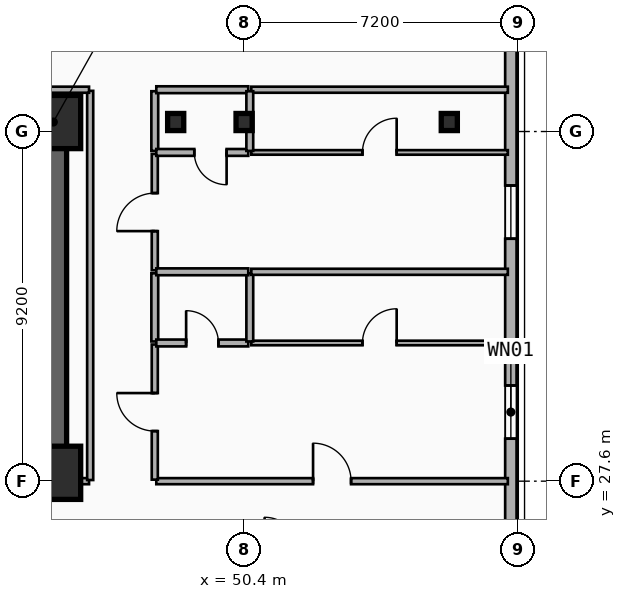
"""IFC4 building model, lengths in metres.
Left out: names, types, materials, properties, quantities, classifications, styles, units other than length and angle.
Written with IfcOpenShell. Run it as: python <this file> out.ifc"""

import sys

from ifc_helpers import new_model, si_unit, direction, frame, frame_2d, origin, origin_2d, place, context, subcontext, project, spatial, rectangle, i_section, extrude, element, fill, save


model = new_model("IFC4")
c1 = context("Model", 3, precision=1e-05, world=origin(), true_north=direction((0.0, 1.0)))
c2 = subcontext(c1, "Body", "Model", "MODEL_VIEW")
j1 = project(units=[si_unit("LENGTHUNIT", "METRE"), si_unit("PLANEANGLEUNIT", "RADIAN")], contexts=[c1])
p1 = place(None, origin())
s1 = spatial("IfcSite", under=j1, at=p1, CompositionType="ELEMENT")
p2 = place(p1, origin())
s2 = spatial("IfcBuilding", under=s1, at=p2, CompositionType="ELEMENT")
p3 = place(p2, frame((0.0, 0.0, 43.0)))
s3 = spatial("IfcBuildingStorey", under=s2, at=p3, CompositionType="ELEMENT", Elevation=43.0)
p4 = place(p3, frame((12.15, 37.05, 0.0), z_axis=(0.0, 0.0, 1.0), x_axis=(1.0, 0.0, 0.0)))
e1 = element("IfcWall", 1, at=p4, inside=s3, PredefinedType="SHEAR", context=c2, shape_type="SweptSolid", body=[
    extrude(rectangle(XDim=33.23, YDim=0.7, at=frame_2d((16.615, 0.0))), origin(), (0.0, 0.0, 1.0), 3.5),
])
p5 = place(p3, frame((45.38, 27.82, 0.0), z_axis=(0.0, 0.0, 1.0), x_axis=(-1.0, 0.0, 0.0)))
e2 = element("IfcWall", 2, at=p5, inside=s3, PredefinedType="SHEAR", context=c2, shape_type="SweptSolid", body=[
    extrude(rectangle(XDim=12.23, YDim=0.7, at=frame_2d((6.115, 0.0))), origin(), (0.0, 0.0, 1.0), 3.5),
])
p6 = place(p5, frame((9.93, 0.0, 0.0)))
e3 = element("IfcOpeningElement", 3, at=p6, cuts=e2, PredefinedType="OPENING", context=c2, shape_type="SweptSolid", body=[
    extrude(rectangle(XDim=1.1, YDim=2.15, at=frame_2d((0.55, 1.075))), frame((0.0, 0.36, 0.0), z_axis=(0.0, -1.0, 0.0), x_axis=(1.0, 0.0, 0.0)), (0.0, 0.0, 1.0), 0.72),
])
p7 = place(p5, frame((6.23, 0.0, 0.0)))
e4 = element("IfcOpeningElement", 4, at=p7, cuts=e2, PredefinedType="OPENING", context=c2, shape_type="SweptSolid", body=[
    extrude(rectangle(XDim=1.1, YDim=2.15, at=frame_2d((0.55, 1.075))), frame((0.0, 0.36, 0.0), z_axis=(0.0, -1.0, 0.0), x_axis=(1.0, 0.0, 0.0)), (0.0, 0.0, 1.0), 0.72),
])
p8 = place(p3, frame((45.38, 28.17, 0.0), z_axis=(0.0, 0.0, 1.0), x_axis=(0.0, 1.0, 0.0)))
e5 = element("IfcWall", 5, at=p8, inside=s3, PredefinedType="SHEAR", context=c2, shape_type="SweptSolid", body=[
    extrude(rectangle(XDim=8.53, YDim=0.7, at=frame_2d((4.265, 0.0))), origin(), (0.0, 0.0, 1.0), 3.5),
])
for number, where, z_axis, x_axis in (
    (6, (45.4, 27.82, 0.0), (0.0, 0.0, 1.0), (1.0, 0.0, 0.0)),
    (7, (45.4, 37.05, 0.0), (0.0, 0.0, 1.0), (1.0, 0.0, 0.0)),
):
    element("IfcColumn", number, at=place(p3, frame(where, z_axis=z_axis, x_axis=x_axis)), inside=s3, PredefinedType="COLUMN", context=c2, shape_type="SweptSolid", body=[
        extrude(rectangle(XDim=1.4, YDim=1.4, at=origin_2d()), origin(), (0.0, 0.0, 1.0), 3.5),
    ])
for number, where, z_axis, x_axis in (
    (8, (48.6, 37.05, 0.0), (0.0, 0.0, 1.0), (1.0, 0.0, 0.0)),
    (9, (50.4, 37.05, 0.0), (0.0, 0.0, 1.0), (1.0, 0.0, 0.0)),
    (10, (55.8, 37.05, 0.0), (0.0, 0.0, 1.0), (1.0, 0.0, 0.0)),
):
    element("IfcColumn", number, at=place(p3, frame(where, z_axis=z_axis, x_axis=x_axis)), inside=s3, PredefinedType="COLUMN", context=c2, shape_type="SweptSolid", body=[
        extrude(i_section(OverallWidth=0.424, OverallDepth=0.45, WebThickness=0.041, FlangeThickness=0.065, FilletRadius=0.015, at=origin_2d()), origin(), (0.0, 0.0, 1.0), 3.5),
    ])
p9 = place(p3, frame((57.42, 41.0, 0.0), z_axis=(0.0, 0.0, 1.0), x_axis=(0.0, -1.0, 0.0)))
e11 = element("IfcWall", 11, at=p9, inside=s3, PredefinedType="SOLIDWALL", context=c2, shape_type="SweptSolid", body=[
    extrude(rectangle(XDim=15.2, YDim=0.3, at=frame_2d((7.6, 0.0))), origin(), (0.0, 0.0, 1.0), 3.24),
])
p10 = place(p9, frame((10.882, 0.0, 0.48)))
e12 = element("IfcOpeningElement", 12, at=p10, cuts=e11, PredefinedType="OPENING", context=c2, shape_type="SweptSolid", body=[
    extrude(rectangle(XDim=1.4, YDim=1.8, at=frame_2d((0.7, 0.9))), frame((0.0, 0.16, 0.0), z_axis=(0.0, -1.0, 0.0), x_axis=(1.0, 0.0, 0.0)), (0.0, 0.0, 1.0), 0.32),
])
p11 = place(p9, frame((5.621, 0.0, 0.48)))
e13 = element("IfcOpeningElement", 13, at=p11, cuts=e11, PredefinedType="OPENING", context=c2, shape_type="SweptSolid", body=[
    extrude(rectangle(XDim=1.4, YDim=1.8, at=frame_2d((0.7, 0.9))), frame((0.0, 0.16, 0.0), z_axis=(0.0, -1.0, 0.0), x_axis=(1.0, 0.0, 0.0)), (0.0, 0.0, 1.0), 0.32),
])
p12 = place(p3, frame((48.09, 27.6, 0.0), z_axis=(0.0, 0.0, 1.0), x_axis=(1.0, 0.0, 0.0)))
e14 = element("IfcWall", 14, at=p12, inside=s3, PredefinedType="PARTITIONING", context=c2, shape_type="SweptSolid", body=[
    extrude(rectangle(XDim=9.25, YDim=0.16, at=frame_2d((4.625, 0.0))), origin(), (0.0, 0.0, 1.0), 2.57),
])
p13 = place(p12, frame((4.125, 0.0, 0.0)))
e15 = element("IfcOpeningElement", 15, at=p13, cuts=e14, PredefinedType="OPENING", context=c2, shape_type="SweptSolid", body=[
    extrude(rectangle(XDim=1.0, YDim=2.15, at=frame_2d((0.5, 1.075))), frame((0.0, 0.09, 0.0), z_axis=(0.0, -1.0, 0.0), x_axis=(1.0, 0.0, 0.0)), (0.0, 0.0, 1.0), 0.18),
])
p14 = place(p3, frame((48.05, 27.64, 0.0), z_axis=(0.0, 0.0, 1.0), x_axis=(0.0, 1.0, 0.0)))
e16 = element("IfcWall", 16, at=p14, inside=s3, PredefinedType="PARTITIONING", context=c2, shape_type="SweptSolid", body=[
    extrude(rectangle(XDim=3.556, YDim=0.16, at=frame_2d((1.778, 0.0))), origin(), (0.0, 0.0, 1.0), 3.24),
])
p15 = place(p14, frame((1.278, 0.0, 0.0)))
e17 = element("IfcOpeningElement", 17, at=p15, cuts=e16, PredefinedType="OPENING", context=c2, shape_type="SweptSolid", body=[
    extrude(rectangle(XDim=1.0, YDim=2.15, at=frame_2d((0.5, 1.075))), frame((0.0, 0.09, 0.0), z_axis=(0.0, -1.0, 0.0), x_axis=(1.0, 0.0, 0.0)), (0.0, 0.0, 1.0), 0.18),
])
p16 = place(p3, frame((48.05, 31.276, 0.0), z_axis=(0.0, 0.0, 1.0), x_axis=(0.0, 1.0, 0.0)))
e18 = element("IfcWall", 18, at=p16, inside=s3, PredefinedType="PLUMBINGWALL", context=c2, shape_type="SweptSolid", body=[
    extrude(rectangle(XDim=1.793, YDim=0.18, at=frame_2d((0.896, 0.0))), origin(), (0.0, 0.0, 1.0), 3.24),
])
p17 = place(p3, frame((48.05, 33.149, 0.0), z_axis=(0.0, 0.0, 1.0), x_axis=(0.0, 1.0, 0.0)))
e19 = element("IfcWall", 19, at=p17, inside=s3, PredefinedType="PARTITIONING", context=c2, shape_type="SweptSolid", body=[
    extrude(rectangle(XDim=3.061, YDim=0.16, at=frame_2d((1.531, 0.0))), origin(), (0.0, 0.0, 1.0), 3.24),
])
p18 = place(p17, frame((1.031, 0.0, 0.0)))
e20 = element("IfcOpeningElement", 20, at=p18, cuts=e19, PredefinedType="OPENING", context=c2, shape_type="SweptSolid", body=[
    extrude(rectangle(XDim=1.0, YDim=2.15, at=frame_2d((0.5, 1.075))), frame((0.0, 0.09, 0.0), z_axis=(0.0, -1.0, 0.0), x_axis=(1.0, 0.0, 0.0)), (0.0, 0.0, 1.0), 0.18),
])
p19 = place(p3, frame((48.05, 36.29, 0.0), z_axis=(0.0, 0.0, 1.0), x_axis=(0.0, 1.0, 0.0)))
e21 = element("IfcWall", 21, at=p19, inside=s3, PredefinedType="PLUMBINGWALL", context=c2, shape_type="SweptSolid", body=[
    extrude(rectangle(XDim=1.57, YDim=0.18, at=frame_2d((0.785, 0.0))), origin(), (0.0, 0.0, 1.0), 2.72),
])
p20 = place(p3, frame((48.09, 37.9, 0.0), z_axis=(0.0, 0.0, 1.0), x_axis=(1.0, 0.0, 0.0)))
e22 = element("IfcWall", 22, at=p20, inside=s3, PredefinedType="PLUMBINGWALL", context=c2, shape_type="SweptSolid", body=[
    extrude(rectangle(XDim=2.42, YDim=0.18, at=frame_2d((1.21, 0.0))), origin(), (0.0, 0.0, 1.0), 3.24),
])
p21 = place(p3, frame((50.59, 37.9, 0.0), z_axis=(0.0, 0.0, 1.0), x_axis=(1.0, 0.0, 0.0)))
e23 = element("IfcWall", 23, at=p21, inside=s3, PredefinedType="PARTITIONING", context=c2, shape_type="SweptSolid", body=[
    extrude(rectangle(XDim=6.75, YDim=0.16, at=frame_2d((3.375, 0.0))), origin(), (0.0, 0.0, 1.0), 3.24),
])
p22 = place(p3, frame((48.09, 31.236, 0.0), z_axis=(0.0, 0.0, 1.0), x_axis=(1.0, 0.0, 0.0)))
e24 = element("IfcWall", 24, at=p22, inside=s3, PredefinedType="PLUMBINGWALL", context=c2, shape_type="SweptSolid", body=[
    extrude(rectangle(XDim=2.42, YDim=0.18, at=frame_2d((1.21, 0.0))), origin(), (0.0, 0.0, 1.0), 2.57),
])
p23 = place(p22, frame((0.785, 0.0, 0.0)))
e25 = element("IfcOpeningElement", 25, at=p23, cuts=e24, PredefinedType="OPENING", context=c2, shape_type="SweptSolid", body=[
    extrude(rectangle(XDim=0.85, YDim=2.1, at=frame_2d((0.425, 1.05))), frame((0.0, 0.1, 0.0), z_axis=(0.0, -1.0, 0.0), x_axis=(1.0, 0.0, 0.0)), (0.0, 0.0, 1.0), 0.2),
])
p24 = place(p3, frame((50.59, 31.236, 0.0), z_axis=(0.0, 0.0, 1.0), x_axis=(1.0, 0.0, 0.0)))
e26 = element("IfcWall", 26, at=p24, inside=s3, PredefinedType="PARTITIONING", context=c2, shape_type="SweptSolid", body=[
    extrude(rectangle(XDim=6.75, YDim=0.12, at=frame_2d((3.375, 0.0))), origin(), (0.0, 0.0, 1.0), 2.57),
])
p25 = place(p24, frame((2.925, 0.0, 0.0)))
e27 = element("IfcOpeningElement", 27, at=p25, cuts=e26, PredefinedType="OPENING", context=c2, shape_type="SweptSolid", body=[
    extrude(rectangle(XDim=0.9, YDim=2.1, at=frame_2d((0.45, 1.05))), frame((0.0, 0.07, 0.0), z_axis=(0.0, -1.0, 0.0), x_axis=(1.0, 0.0, 0.0)), (0.0, 0.0, 1.0), 0.14),
])
p26 = place(p3, frame((50.55, 31.276, 0.0), z_axis=(0.0, 0.0, 1.0), x_axis=(0.0, 1.0, 0.0)))
e28 = element("IfcWall", 28, at=p26, inside=s3, PredefinedType="PLUMBINGWALL", context=c2, shape_type="SweptSolid", body=[
    extrude(rectangle(XDim=1.793, YDim=0.18, at=frame_2d((0.896, 0.0))), origin(), (0.0, 0.0, 1.0), 2.57),
])
p27 = place(p3, frame((48.09, 33.109, 0.0), z_axis=(0.0, 0.0, 1.0), x_axis=(1.0, 0.0, 0.0)))
e29 = element("IfcWall", 29, at=p27, inside=s3, PredefinedType="PLUMBINGWALL", context=c2, shape_type="SweptSolid", body=[
    extrude(rectangle(XDim=2.42, YDim=0.18, at=frame_2d((1.21, 0.0))), origin(), (0.0, 0.0, 1.0), 2.57),
])
p28 = place(p3, frame((50.59, 33.109, 0.0), z_axis=(0.0, 0.0, 1.0), x_axis=(1.0, 0.0, 0.0)))
e30 = element("IfcWall", 30, at=p28, inside=s3, PredefinedType="PARTITIONING", context=c2, shape_type="SweptSolid", body=[
    extrude(rectangle(XDim=6.75, YDim=0.16, at=frame_2d((3.375, 0.0))), origin(), (0.0, 0.0, 1.0), 2.57),
])
p29 = place(p3, frame((50.51, 36.25, 0.0), z_axis=(0.0, 0.0, 1.0), x_axis=(-1.0, 0.0, 0.0)))
e31 = element("IfcWall", 31, at=p29, inside=s3, PredefinedType="PLUMBINGWALL", context=c2, shape_type="SweptSolid", body=[
    extrude(rectangle(XDim=2.42, YDim=0.18, at=frame_2d((1.21, 0.0))), origin(), (0.0, 0.0, 1.0), 2.57),
])
p30 = place(p29, frame((0.57, 0.0, 0.0)))
e32 = element("IfcOpeningElement", 32, at=p30, cuts=e31, PredefinedType="OPENING", context=c2, shape_type="SweptSolid", body=[
    extrude(rectangle(XDim=0.85, YDim=2.1, at=frame_2d((0.425, 1.05))), frame((0.0, 0.1, 0.0), z_axis=(0.0, -1.0, 0.0), x_axis=(1.0, 0.0, 0.0)), (0.0, 0.0, 1.0), 0.2),
])
p31 = place(p3, frame((50.59, 36.25, 0.0), z_axis=(0.0, 0.0, 1.0), x_axis=(1.0, 0.0, 0.0)))
e33 = element("IfcWall", 33, at=p31, inside=s3, PredefinedType="PARTITIONING", context=c2, shape_type="SweptSolid", body=[
    extrude(rectangle(XDim=6.75, YDim=0.12, at=frame_2d((3.375, 0.0))), origin(), (0.0, 0.0, 1.0), 2.57),
])
p32 = place(p31, frame((2.925, 0.0, 0.0)))
e34 = element("IfcOpeningElement", 34, at=p32, cuts=e33, PredefinedType="OPENING", context=c2, shape_type="SweptSolid", body=[
    extrude(rectangle(XDim=0.9, YDim=2.1, at=frame_2d((0.45, 1.05))), frame((0.0, 0.07, 0.0), z_axis=(0.0, -1.0, 0.0), x_axis=(1.0, 0.0, 0.0)), (0.0, 0.0, 1.0), 0.14),
])
p33 = place(p3, frame((50.55, 36.29, 0.0), z_axis=(0.0, 0.0, 1.0), x_axis=(0.0, 1.0, 0.0)))
e35 = element("IfcWall", 35, at=p33, inside=s3, PredefinedType="PLUMBINGWALL", context=c2, shape_type="SweptSolid", body=[
    extrude(rectangle(XDim=1.57, YDim=0.18, at=frame_2d((0.785, 0.0))), origin(), (0.0, 0.0, 1.0), 2.57),
])
p34 = place(p3, frame((45.41, 27.6, 0.0), z_axis=(0.0, 0.0, 1.0), x_axis=(1.0, 0.0, 0.0)))
e36 = element("IfcWall", 36, at=p34, inside=s3, PredefinedType="PARTITIONING", context=c2, shape_type="SweptSolid", body=[
    extrude(rectangle(XDim=0.91, YDim=0.16, at=frame_2d((0.455, 0.0))), origin(), (0.0, 0.0, 1.0), 2.28),
])
p35 = place(p3, frame((46.35, 27.63, 0.0), z_axis=(0.0, 0.0, 1.0), x_axis=(0.0, 1.0, 0.0)))
e37 = element("IfcWall", 37, at=p35, inside=s3, PredefinedType="PARTITIONING", context=c2, shape_type="SweptSolid", body=[
    extrude(rectangle(XDim=10.24, YDim=0.16, at=frame_2d((5.12, 0.0))), origin(), (0.0, 0.0, 1.0), 2.72),
])
p36 = place(p3, frame((11.28, 37.9, 0.0), z_axis=(0.0, 0.0, 1.0), x_axis=(1.0, 0.0, 0.0)))
e38 = element("IfcWall", 38, at=p36, inside=s3, PredefinedType="PARTITIONING", context=c2, shape_type="SweptSolid", body=[
    extrude(rectangle(XDim=35.04, YDim=0.16, at=frame_2d((17.52, 0.0))), origin(), (0.0, 0.0, 1.0), 3.24),
])
p37 = place(p10, origin())
e39 = element("IfcWindow", 39, at=p37, inside=s3, PartitioningType="SINGLE_PANEL", PredefinedType="WINDOW", context=c2, shape_type="SweptSolid", body=[
    extrude(rectangle(XDim=1.4, YDim=1.8, at=frame_2d((0.7, 0.9))), frame((0.0, 0.03, 0.0), z_axis=(0.0, -1.0, 0.0), x_axis=(1.0, 0.0, 0.0)), (0.0, 0.0, 1.0), 0.06),
])
fill(e12, e39)
p38 = place(p11, origin())
e40 = element("IfcWindow", 40, at=p38, inside=s3, PartitioningType="SINGLE_PANEL", PredefinedType="WINDOW", context=c2, shape_type="SweptSolid", body=[
    extrude(rectangle(XDim=1.4, YDim=1.8, at=frame_2d((0.7, 0.9))), frame((0.0, 0.03, 0.0), z_axis=(0.0, -1.0, 0.0), x_axis=(1.0, 0.0, 0.0)), (0.0, 0.0, 1.0), 0.06),
])
fill(e13, e40)
p39 = place(p13, origin())
e41 = element("IfcDoor", 41, at=p39, inside=s3, OperationType="SINGLE_SWING_LEFT", PredefinedType="DOOR", context=c2, shape_type="SweptSolid", body=[
    extrude(rectangle(XDim=1.0, YDim=2.15, at=frame_2d((0.5, 1.075))), frame((0.0, 0.025, 0.0), z_axis=(0.0, -1.0, 0.0), x_axis=(1.0, 0.0, 0.0)), (0.0, 0.0, 1.0), 0.05),
])
fill(e15, e41)
p40 = place(p15, origin())
e42 = element("IfcDoor", 42, at=p40, inside=s3, OperationType="SINGLE_SWING_RIGHT", PredefinedType="DOOR", context=c2, shape_type="SweptSolid", body=[
    extrude(rectangle(XDim=1.0, YDim=2.15, at=frame_2d((0.5, 1.075))), frame((0.0, 0.025, 0.0), z_axis=(0.0, -1.0, 0.0), x_axis=(1.0, 0.0, 0.0)), (0.0, 0.0, 1.0), 0.05),
])
fill(e17, e42)
p41 = place(p18, origin())
e43 = element("IfcDoor", 43, at=p41, inside=s3, OperationType="SINGLE_SWING_LEFT", PredefinedType="DOOR", context=c2, shape_type="SweptSolid", body=[
    extrude(rectangle(XDim=1.0, YDim=2.15, at=frame_2d((0.5, 1.075))), frame((0.0, 0.025, 0.0), z_axis=(0.0, -1.0, 0.0), x_axis=(1.0, 0.0, 0.0)), (0.0, 0.0, 1.0), 0.05),
])
fill(e20, e43)
p42 = place(p23, origin())
e44 = element("IfcDoor", 44, at=p42, inside=s3, OperationType="SINGLE_SWING_LEFT", PredefinedType="DOOR", context=c2, shape_type="SweptSolid", body=[
    extrude(rectangle(XDim=0.85, YDim=2.1, at=frame_2d((0.425, 1.05))), frame((0.0, 0.025, 0.0), z_axis=(0.0, -1.0, 0.0), x_axis=(1.0, 0.0, 0.0)), (0.0, 0.0, 1.0), 0.05),
])
fill(e25, e44)
p43 = place(p25, origin())
e45 = element("IfcDoor", 45, at=p43, inside=s3, OperationType="SINGLE_SWING_RIGHT", PredefinedType="DOOR", context=c2, shape_type="SweptSolid", body=[
    extrude(rectangle(XDim=0.9, YDim=2.1, at=frame_2d((0.45, 1.05))), frame((0.0, 0.025, 0.0), z_axis=(0.0, -1.0, 0.0), x_axis=(1.0, 0.0, 0.0)), (0.0, 0.0, 1.0), 0.05),
])
fill(e27, e45)
p44 = place(p30, origin())
e46 = element("IfcDoor", 46, at=p44, inside=s3, OperationType="SINGLE_SWING_LEFT", PredefinedType="DOOR", context=c2, shape_type="SweptSolid", body=[
    extrude(rectangle(XDim=0.85, YDim=2.1, at=frame_2d((0.425, 1.05))), frame((0.0, 0.025, 0.0), z_axis=(0.0, -1.0, 0.0), x_axis=(1.0, 0.0, 0.0)), (0.0, 0.0, 1.0), 0.05),
])
fill(e32, e46)
p45 = place(p32, origin())
e47 = element("IfcDoor", 47, at=p45, inside=s3, OperationType="SINGLE_SWING_RIGHT", PredefinedType="DOOR", context=c2, shape_type="SweptSolid", body=[
    extrude(rectangle(XDim=0.9, YDim=2.1, at=frame_2d((0.45, 1.05))), frame((0.0, 0.025, 0.0), z_axis=(0.0, -1.0, 0.0), x_axis=(1.0, 0.0, 0.0)), (0.0, 0.0, 1.0), 0.05),
])
fill(e34, e47)
save(model, sys.argv[1])
